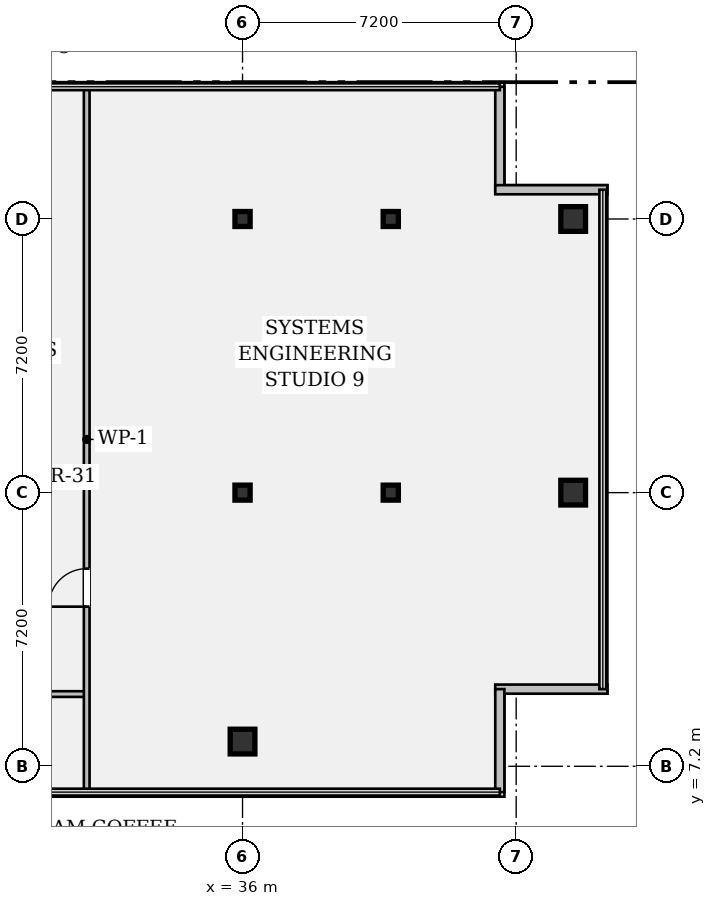
"""IFC4 building model, lengths in metres.
Left out: names, types, materials, properties, quantities, classifications, styles, units other than length and angle.
Written with IfcOpenShell. Run it as: python <this file> out.ifc"""

import sys

from ifc_helpers import new_model, si_unit, direction, frame, frame_2d, origin, origin_2d, place, context, subcontext, project, spatial, rectangle, hollow_rectangle, i_section, extrude, element, fill, save


model = new_model("IFC4")
c1 = context("Model", 3, precision=1e-05, world=origin(), true_north=direction((0.0, 1.0)))
c2 = subcontext(c1, "Body", "Model", "MODEL_VIEW")
j1 = project(units=[si_unit("LENGTHUNIT", "METRE"), si_unit("PLANEANGLEUNIT", "RADIAN")], contexts=[c1])
p1 = place(None, origin())
s1 = spatial("IfcSite", under=j1, at=p1, CompositionType="ELEMENT")
p2 = place(p1, origin())
s2 = spatial("IfcBuilding", under=s1, at=p2, CompositionType="ELEMENT")
p3 = place(p2, frame((0.0, 0.0, 290.15)))
s3 = spatial("IfcBuildingStorey", under=s2, at=p3, CompositionType="ELEMENT", Elevation=290.15)
p4 = place(p3, frame((36.0, 7.85, 0.0), z_axis=(0.0, 0.0, 1.0), x_axis=(1.0, 0.0, 0.0)))
e1 = element("IfcColumn", 1, at=p4, inside=s3, PredefinedType="COLUMN", context=c2, shape_type="SweptSolid", body=[
    extrude(hollow_rectangle(XDim=0.65, YDim=0.65, WallThickness=0.04, at=origin_2d()), origin(), (0.0, 0.0, 1.0), 3.24),
])
for number, where, z_axis, x_axis in (
    (2, (36.0, 14.4, 0.0), (0.0, 0.0, 1.0), (1.0, 0.0, 0.0)),
    (3, (36.0, 21.6, 0.0), (0.0, 0.0, 1.0), (1.0, 0.0, 0.0)),
    (4, (39.9, 14.4, 0.0), (0.0, 0.0, 1.0), (1.0, 0.0, 0.0)),
    (5, (39.9, 21.6, 0.0), (0.0, 0.0, 1.0), (1.0, 0.0, 0.0)),
):
    element("IfcColumn", number, at=place(p3, frame(where, z_axis=z_axis, x_axis=x_axis)), inside=s3, PredefinedType="COLUMN", context=c2, shape_type="SweptSolid", body=[
        extrude(i_section(OverallWidth=0.399, OverallDepth=0.394, WebThickness=0.023, FlangeThickness=0.037, FilletRadius=0.018, at=origin_2d()), origin(), (0.0, 0.0, 1.0), 3.24),
    ])
for number, where, z_axis, x_axis in (
    (6, (44.7, 14.4, 0.0), (0.0, 0.0, 1.0), (1.0, 0.0, 0.0)),
    (7, (44.7, 21.6, 0.0), (0.0, 0.0, 1.0), (1.0, 0.0, 0.0)),
):
    element("IfcColumn", number, at=place(p3, frame(where, z_axis=z_axis, x_axis=x_axis)), inside=s3, PredefinedType="COLUMN", context=c2, shape_type="SweptSolid", body=[
        extrude(hollow_rectangle(XDim=0.65, YDim=0.65, WallThickness=0.04, at=origin_2d()), origin(), (0.0, 0.0, 1.0), 3.24),
    ])
p5 = place(p3, frame((42.77, 25.08, 0.0), z_axis=(0.0, 0.0, 1.0), x_axis=(0.0, -1.0, 0.0)))
e8 = element("IfcWall", 8, at=p5, inside=s3, PredefinedType="STANDARD", context=c2, shape_type="SweptSolid", body=[
    extrude(rectangle(XDim=2.71, YDim=0.24, at=frame_2d((1.355, 0.0))), origin(), (0.0, 0.0, 1.0), 3.24),
])
for number, where, z_axis, x_axis in (
    (9, (42.65, 22.37, 0.0), (0.0, 0.0, 1.0), (1.0, 0.0, 0.0)),
    (10, (45.6, 9.23, 0.0), (0.0, 0.0, 1.0), (-1.0, 0.0, 0.0)),
):
    element("IfcWall", number, at=place(p3, frame(where, z_axis=z_axis, x_axis=x_axis)), inside=s3, PredefinedType="STANDARD", context=c2, shape_type="SweptSolid", body=[
        extrude(rectangle(XDim=2.95, YDim=0.24, at=frame_2d((1.475, 0.0))), origin(), (0.0, 0.0, 1.0), 3.24),
    ])
p6 = place(p3, frame((42.77, 9.23, 0.0), z_axis=(0.0, 0.0, 1.0), x_axis=(0.0, -1.0, 0.0)))
e11 = element("IfcWall", 11, at=p6, inside=s3, PredefinedType="STANDARD", context=c2, shape_type="SweptSolid", body=[
    extrude(rectangle(XDim=2.71, YDim=0.24, at=frame_2d((1.355, 0.0))), origin(), (0.0, 0.0, 1.0), 3.24),
])
p7 = place(p3, frame((29.95, 9.1, 0.0), z_axis=(0.0, 0.0, 1.0), x_axis=(1.0, 0.0, 0.0)))
e12 = element("IfcWall", 12, at=p7, inside=s3, PredefinedType="PARTITIONING", context=c2, shape_type="SweptSolid", body=[
    extrude(rectangle(XDim=1.95, YDim=0.15, at=frame_2d((0.975, 0.0))), origin(), (0.0, 0.0, 1.0), 3.24),
])
p8 = place(p3, frame((29.95, 14.75, 0.0), z_axis=(0.0, 0.0, 1.0), x_axis=(1.0, 0.0, 0.0)))
e13 = element("IfcWall", 13, at=p8, inside=s3, PredefinedType="PARTITIONING", context=c2, shape_type="SweptSolid", body=[
    extrude(rectangle(XDim=1.95, YDim=0.135, at=frame_2d((0.975, 0.0))), origin(), (0.0, 0.0, 1.0), 2.915),
])
p9 = place(p3, frame((31.9, 6.52, 0.0), z_axis=(0.0, 0.0, 1.0), x_axis=(0.0, 1.0, 0.0)))
e14 = element("IfcWall", 14, at=p9, inside=s3, PredefinedType="PARTITIONING", context=c2, shape_type="SweptSolid", body=[
    extrude(rectangle(XDim=18.56, YDim=0.15, at=frame_2d((9.28, 0.0))), origin(), (0.0, 0.0, 1.0), 2.676),
])
p10 = place(p9, frame((4.88, 0.0, 0.0)))
e15 = element("IfcOpeningElement", 15, at=p10, cuts=e14, PredefinedType="OPENING", context=c2, shape_type="SweptSolid", body=[
    extrude(rectangle(XDim=1.0, YDim=2.15, at=frame_2d((0.5, 1.075))), frame((0.0, 0.087, 0.0), z_axis=(0.0, -1.0, 0.0), x_axis=(1.0, 0.0, 0.0)), (0.0, 0.0, 1.0), 0.174),
])
p11 = place(p10, origin())
e16 = element("IfcDoor", 16, at=p11, inside=s3, OperationType="SINGLE_SWING_LEFT", PredefinedType="DOOR", context=c2, shape_type="SweptSolid", body=[
    extrude(rectangle(XDim=1.0, YDim=2.15, at=frame_2d((0.5, 1.075))), frame((0.0, 0.025, 0.0), z_axis=(0.0, -1.0, 0.0), x_axis=(1.0, 0.0, 0.0)), (0.0, 0.0, 1.0), 0.05),
])
fill(e15, e16)
save(model, sys.argv[1])
